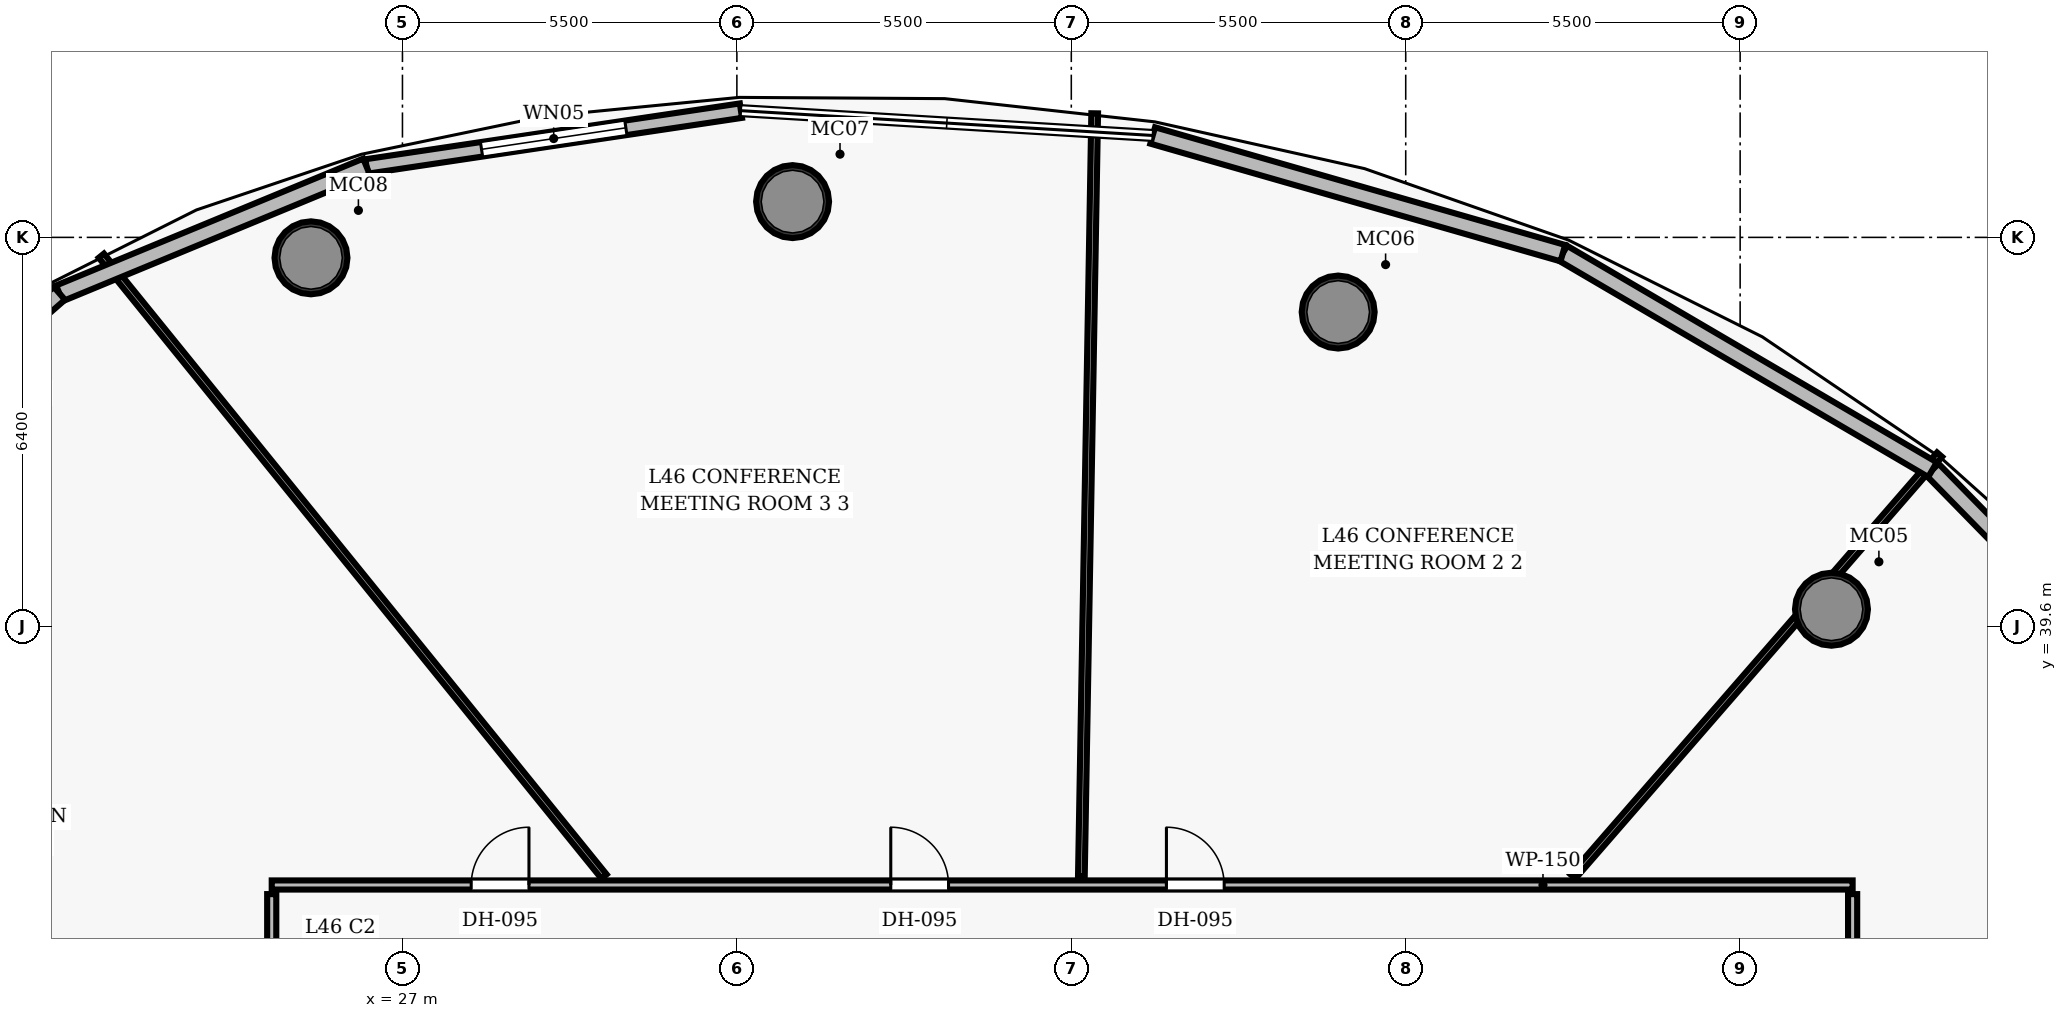
"""IFC4 building model, lengths in metres.
Left out: names, types, materials, properties, quantities, classifications, styles, units other than length and angle.
Written with IfcOpenShell. Run it as: python <this file> out.ifc"""

import sys

from ifc_helpers import new_model, si_unit, direction, frame, frame_2d, origin, origin_2d, place, context, subcontext, project, spatial, rectangle, hollow_circle, extrude, element, fill, save


model = new_model("IFC4")
c1 = context("Model", 3, precision=1e-05, world=origin(), true_north=direction((0.0, 1.0)))
c2 = subcontext(c1, "Body", "Model", "MODEL_VIEW")
j1 = project(units=[si_unit("LENGTHUNIT", "METRE"), si_unit("PLANEANGLEUNIT", "RADIAN")], contexts=[c1])
p1 = place(None, origin())
s1 = spatial("IfcSite", under=j1, at=p1, CompositionType="ELEMENT")
p2 = place(p1, origin())
s2 = spatial("IfcBuilding", under=s1, at=p2, CompositionType="ELEMENT")
p3 = place(p2, frame((0.0, 0.0, 182.75)))
s3 = spatial("IfcBuildingStorey", under=s2, at=p3, CompositionType="ELEMENT", Elevation=182.75)
for number, where, z_axis, x_axis in (
    (1, (50.502, 39.885, 0.0), (0.0, 0.0, 1.0), (1.0, 0.0, 0.0)),
    (2, (42.389, 44.772, 0.0), (0.0, 0.0, 1.0), (1.0, 0.0, 0.0)),
    (3, (33.416, 46.588, 0.0), (0.0, 0.0, 1.0), (1.0, 0.0, 0.0)),
    (4, (25.496, 45.664, 0.0), (0.0, 0.0, 1.0), (1.0, 0.0, 0.0)),
):
    element("IfcColumn", number, at=place(p3, frame(where, z_axis=z_axis, x_axis=x_axis)), inside=s3, PredefinedType="COLUMN", context=c2, shape_type="SweptSolid", body=[
        extrude(hollow_circle(Radius=0.6, WallThickness=0.05, at=origin_2d()), origin(), (0.0, 0.0, 1.0), 3.85),
    ])
p4 = place(p3, frame((24.85, 35.35, 0.0), z_axis=(0.0, 0.0, 1.0), x_axis=(1.0, 0.0, 0.0)))
e5 = element("IfcWall", 5, at=p4, inside=s3, PredefinedType="PARTITIONING", context=c2, shape_type="SweptSolid", body=[
    extrude(rectangle(XDim=26.0, YDim=0.15, at=frame_2d((13.0, 0.0))), origin(), (0.0, 0.0, 1.0), 3.035),
])
p5 = place(p4, frame((14.715, 0.0, 0.0)))
e6 = element("IfcOpeningElement", 6, at=p5, cuts=e5, PredefinedType="OPENING", context=c2, shape_type="SweptSolid", body=[
    extrude(rectangle(XDim=0.95, YDim=2.15, at=frame_2d((0.475, 1.075))), frame((0.0, 0.085, 0.0), z_axis=(0.0, -1.0, 0.0), x_axis=(1.0, 0.0, 0.0)), (0.0, 0.0, 1.0), 0.17),
])
p6 = place(p4, frame((10.181, 0.0, 0.0)))
e7 = element("IfcOpeningElement", 7, at=p6, cuts=e5, PredefinedType="OPENING", context=c2, shape_type="SweptSolid", body=[
    extrude(rectangle(XDim=0.95, YDim=2.15, at=frame_2d((0.475, 1.075))), frame((0.0, 0.085, 0.0), z_axis=(0.0, -1.0, 0.0), x_axis=(1.0, 0.0, 0.0)), (0.0, 0.0, 1.0), 0.17),
])
p7 = place(p4, frame((3.281, 0.0, 0.0)))
e8 = element("IfcOpeningElement", 8, at=p7, cuts=e5, PredefinedType="OPENING", context=c2, shape_type="SweptSolid", body=[
    extrude(rectangle(XDim=0.95, YDim=2.15, at=frame_2d((0.475, 1.075))), frame((0.0, 0.085, 0.0), z_axis=(0.0, -1.0, 0.0), x_axis=(1.0, 0.0, 0.0)), (0.0, 0.0, 1.0), 0.17),
])
p8 = place(p3, frame((24.85, 27.08, 0.0), z_axis=(0.0, 0.0, 1.0), x_axis=(0.0, 1.0, 0.0)))
e9 = element("IfcWall", 9, at=p8, inside=s3, PredefinedType="PARTITIONING", context=c2, shape_type="SweptSolid", body=[
    extrude(rectangle(XDim=8.12, YDim=0.15, at=frame_2d((4.06, 0.0))), origin(), (0.0, 0.0, 1.0), 3.035),
])
p9 = place(p3, frame((50.85, 27.08, 0.0), z_axis=(0.0, 0.0, 1.0), x_axis=(0.0, 1.0, 0.0)))
e10 = element("IfcWall", 10, at=p9, inside=s3, PredefinedType="PARTITIONING", context=c2, shape_type="SweptSolid", body=[
    extrude(rectangle(XDim=8.12, YDim=0.15, at=frame_2d((4.06, 0.0))), origin(), (0.0, 0.0, 1.0), 3.035),
])
p10 = place(p9, frame((2.063, 0.0, 0.0)))
e11 = element("IfcOpeningElement", 11, at=p10, cuts=e10, PredefinedType="OPENING", context=c2, shape_type="SweptSolid", body=[
    extrude(rectangle(XDim=0.95, YDim=2.15, at=frame_2d((0.475, 1.075))), frame((0.0, 0.085, 0.0), z_axis=(0.0, -1.0, 0.0), x_axis=(1.0, 0.0, 0.0)), (0.0, 0.0, 1.0), 0.17),
])
p11 = place(p3, frame((46.25, 35.49, 0.0), z_axis=(0.0, 0.0, 1.0), x_axis=(0.656060339629, 0.7547084409, 0.0)))
e12 = element("IfcWall", 12, at=p11, inside=s3, PredefinedType="PARTITIONING", context=c2, shape_type="SweptSolid", body=[
    extrude(rectangle(XDim=9.192, YDim=0.11, at=frame_2d((4.596, 0.0))), origin(), (0.0, 0.0, 1.0), 3.035),
])
p12 = place(p3, frame((38.166, 35.49, 0.0), z_axis=(0.0, 0.0, 1.0), x_axis=(0.017466452874, 0.999847449876, 0.0)))
e13 = element("IfcWall", 13, at=p12, inside=s3, PredefinedType="PARTITIONING", context=c2, shape_type="SweptSolid", body=[
    extrude(rectangle(XDim=12.552, YDim=0.11, at=frame_2d((6.276, 0.0))), origin(), (0.0, 0.0, 1.0), 3.035),
])
p13 = place(p3, frame((30.315, 35.49, 0.0), z_axis=(0.0, 0.0, 1.0), x_axis=(-0.629312097209, 0.777152677603, 0.0)))
e14 = element("IfcWall", 14, at=p13, inside=s3, PredefinedType="PARTITIONING", context=c2, shape_type="SweptSolid", body=[
    extrude(rectangle(XDim=13.137, YDim=0.11, at=frame_2d((6.568, 0.0))), origin(), (0.0, 0.0, 1.0), 3.035),
])
p14 = place(p3, frame((52.164, 42.18, 0.0), z_axis=(0.0, 0.0, 1.0), x_axis=(0.699092043152, -0.71503168825, 0.0)))
e15 = element("IfcWall", 15, at=p14, inside=s3, PredefinedType="SOLIDWALL", context=c2, shape_type="SweptSolid", body=[
    extrude(rectangle(XDim=7.046, YDim=0.28, at=frame_2d((3.523, 0.0))), origin(), (0.0, 0.0, 1.0), 3.62),
])
p15 = place(p3, frame((46.084, 45.74, 0.0), z_axis=(0.0, 0.0, 1.0), x_axis=(0.862920491518, -0.505339712786, 0.0)))
e16 = element("IfcWall", 16, at=p15, inside=s3, PredefinedType="SOLIDWALL", context=c2, shape_type="SweptSolid", body=[
    extrude(rectangle(XDim=7.045, YDim=0.28, at=frame_2d((3.523, 0.0))), origin(), (0.0, 0.0, 1.0), 3.62),
])
p16 = place(p3, frame((39.339, 47.676, 0.0), z_axis=(0.0, 0.0, 1.0), x_axis=(0.96121351929, -0.275805312375, 0.0)))
e17 = element("IfcWall", 17, at=p16, inside=s3, PredefinedType="SOLIDWALL", context=c2, shape_type="SweptSolid", body=[
    extrude(rectangle(XDim=7.018, YDim=0.28, at=frame_2d((3.509, 0.0))), origin(), (0.0, 0.0, 1.0), 3.62),
])
p17 = place(p3, frame((26.408, 47.166, 0.0), z_axis=(0.0, 0.0, 1.0), x_axis=(0.989072545398, 0.147429644032, 0.0)))
e18 = element("IfcWall", 18, at=p17, inside=s3, PredefinedType="SOLIDWALL", context=c2, shape_type="SweptSolid", body=[
    extrude(rectangle(XDim=6.227, YDim=0.24, at=frame_2d((3.113, 0.0))), origin(), (0.0, 0.0, 1.0), 3.62),
])
p18 = place(p17, frame((1.913, 0.0, 0.85)))
e19 = element("IfcOpeningElement", 19, at=p18, cuts=e18, PredefinedType="OPENING", context=c2, shape_type="SweptSolid", body=[
    extrude(rectangle(XDim=2.4, YDim=2.0, at=frame_2d((1.2, 1.0))), frame((0.0, 0.13, 0.0), z_axis=(0.0, -1.0, 0.0), x_axis=(1.0, 0.0, 0.0)), (0.0, 0.0, 1.0), 0.26),
])
p19 = place(p3, frame((21.358, 45.079, 0.0), z_axis=(0.0, 0.0, 1.0), x_axis=(0.924217553659, 0.38186635556, 0.0)))
e20 = element("IfcWall", 20, at=p19, inside=s3, PredefinedType="SOLIDWALL", context=c2, shape_type="SweptSolid", body=[
    extrude(rectangle(XDim=5.464, YDim=0.28, at=frame_2d((2.732, 0.0))), origin(), (0.0, 0.0, 1.0), 3.62),
])
p20 = place(p3, frame((17.685, 41.872, 0.0), z_axis=(0.0, 0.0, 1.0), x_axis=(0.753209053351, 0.657781211308, 0.0)))
e21 = element("IfcWall", 21, at=p20, inside=s3, PredefinedType="SOLIDWALL", context=c2, shape_type="SweptSolid", body=[
    extrude(rectangle(XDim=4.876, YDim=0.28, at=frame_2d((2.438, 0.0))), origin(), (0.0, 0.0, 1.0), 3.62),
])
p21 = place(p5, origin())
e22 = element("IfcDoor", 22, at=p21, inside=s3, OperationType="SINGLE_SWING_LEFT", PredefinedType="DOOR", context=c2, shape_type="SweptSolid", body=[
    extrude(rectangle(XDim=0.95, YDim=2.15, at=frame_2d((0.475, 1.075))), frame((0.0, 0.025, 0.0), z_axis=(0.0, -1.0, 0.0), x_axis=(1.0, 0.0, 0.0)), (0.0, 0.0, 1.0), 0.05),
])
fill(e6, e22)
p22 = place(p6, origin())
e23 = element("IfcDoor", 23, at=p22, inside=s3, OperationType="SINGLE_SWING_LEFT", PredefinedType="DOOR", context=c2, shape_type="SweptSolid", body=[
    extrude(rectangle(XDim=0.95, YDim=2.15, at=frame_2d((0.475, 1.075))), frame((0.0, 0.025, 0.0), z_axis=(0.0, -1.0, 0.0), x_axis=(1.0, 0.0, 0.0)), (0.0, 0.0, 1.0), 0.05),
])
fill(e7, e23)
p23 = place(p7, origin())
e24 = element("IfcDoor", 24, at=p23, inside=s3, OperationType="SINGLE_SWING_RIGHT", PredefinedType="DOOR", context=c2, shape_type="SweptSolid", body=[
    extrude(rectangle(XDim=0.95, YDim=2.15, at=frame_2d((0.475, 1.075))), frame((0.0, 0.025, 0.0), z_axis=(0.0, -1.0, 0.0), x_axis=(1.0, 0.0, 0.0)), (0.0, 0.0, 1.0), 0.05),
])
fill(e8, e24)
p24 = place(p18, origin())
e25 = element("IfcWindow", 25, at=p24, inside=s3, PartitioningType="SINGLE_PANEL", PredefinedType="WINDOW", context=c2, shape_type="SweptSolid", body=[
    extrude(rectangle(XDim=2.4, YDim=2.0, at=frame_2d((1.2, 1.0))), frame((0.0, 0.03, 0.0), z_axis=(0.0, -1.0, 0.0), x_axis=(1.0, 0.0, 0.0)), (0.0, 0.0, 1.0), 0.06),
])
fill(e19, e25)
save(model, sys.argv[1])
